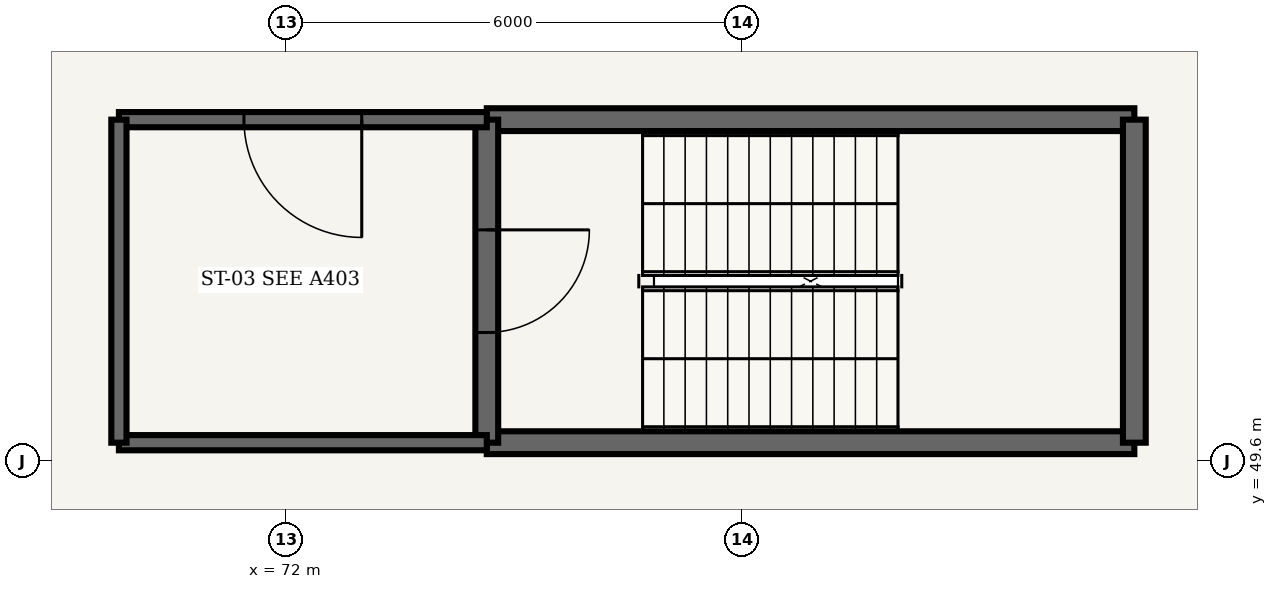
"""IFC4 building model, lengths in metres.
Left out: names, types, materials, properties, quantities, classifications, styles, units other than length and angle.
Written with IfcOpenShell. Run it as: python <this file> out.ifc"""

import sys

from ifc_helpers import new_model, si_unit, direction, frame, frame_2d, origin, place, context, subcontext, project, spatial, rectangle, extrude, element, fill, save


model = new_model("IFC4")
c1 = context("Model", 3, precision=1e-05, world=origin(), true_north=direction((0.0, 1.0)))
c2 = subcontext(c1, "Body", "Model", "MODEL_VIEW")
j1 = project(units=[si_unit("LENGTHUNIT", "METRE"), si_unit("PLANEANGLEUNIT", "RADIAN")], contexts=[c1])
p1 = place(None, origin())
s1 = spatial("IfcSite", under=j1, at=p1, CompositionType="ELEMENT")
p2 = place(p1, origin())
s2 = spatial("IfcBuilding", under=s1, at=p2, CompositionType="ELEMENT")
p3 = place(p2, frame((0.0, 0.0, 15.6)))
s3 = spatial("IfcBuildingStorey", under=s2, at=p3, CompositionType="ELEMENT", Elevation=15.6)
for number, where, z_axis, x_axis in (
    (1, (74.64, 49.84, 0.0), (0.0, 0.0, 1.0), (1.0, 0.0, 0.0)),
    (2, (83.16, 54.09, 0.0), (0.0, 0.0, 1.0), (-1.0, 0.0, 0.0)),
):
    element("IfcWall", number, at=place(p3, frame(where, z_axis=z_axis, x_axis=x_axis)), inside=s3, PredefinedType="SHEAR", context=c2, shape_type="SweptSolid", body=[
        extrude(rectangle(XDim=8.52, YDim=0.3, at=frame_2d((4.26, 0.0))), origin(), (0.0, 0.0, 1.0), 4.55),
    ])
p4 = place(p3, frame((74.64, 54.09, 0.0), z_axis=(0.0, 0.0, 1.0), x_axis=(0.0, -1.0, 0.0)))
e3 = element("IfcWall", 3, at=p4, inside=s3, PredefinedType="SHEAR", context=c2, shape_type="SweptSolid", body=[
    extrude(rectangle(XDim=4.25, YDim=0.3, at=frame_2d((2.125, 0.0))), origin(), (0.0, 0.0, 1.0), 4.55),
])
p5 = place(p4, frame((1.45, 0.0, 0.0)))
e4 = element("IfcOpeningElement", 4, at=p5, cuts=e3, PredefinedType="OPENING", context=c2, shape_type="SweptSolid", body=[
    extrude(rectangle(XDim=1.35, YDim=2.2, at=frame_2d((0.675, 1.1))), frame((0.0, 0.16, 0.0), z_axis=(0.0, -1.0, 0.0), x_axis=(1.0, 0.0, 0.0)), (0.0, 0.0, 1.0), 0.32),
])
p6 = place(p3, frame((83.16, 49.84, 0.0), z_axis=(0.0, 0.0, 1.0), x_axis=(0.0, 1.0, 0.0)))
e5 = element("IfcWall", 5, at=p6, inside=s3, PredefinedType="SHEAR", context=c2, shape_type="SweptSolid", body=[
    extrude(rectangle(XDim=4.25, YDim=0.3, at=frame_2d((2.125, 0.0))), origin(), (0.0, 0.0, 1.0), 4.55),
])
p7 = place(p3, frame((69.8, 49.84, 0.0), z_axis=(0.0, 0.0, 1.0), x_axis=(1.0, 0.0, 0.0)))
e6 = element("IfcWall", 6, at=p7, inside=s3, PredefinedType="SHEAR", context=c2, shape_type="SweptSolid", body=[
    extrude(rectangle(XDim=4.84, YDim=0.2, at=frame_2d((2.42, 0.0))), origin(), (0.0, 0.0, 1.0), 4.55),
])
p8 = place(p3, frame((74.64, 54.09, 0.0), z_axis=(0.0, 0.0, 1.0), x_axis=(-1.0, 0.0, 0.0)))
e7 = element("IfcWall", 7, at=p8, inside=s3, PredefinedType="SHEAR", context=c2, shape_type="SweptSolid", body=[
    extrude(rectangle(XDim=4.84, YDim=0.2, at=frame_2d((2.42, 0.0))), origin(), (0.0, 0.0, 1.0), 4.55),
])
p9 = place(p8, frame((1.645, 0.0, 0.0)))
e8 = element("IfcOpeningElement", 8, at=p9, cuts=e7, PredefinedType="OPENING", context=c2, shape_type="SweptSolid", body=[
    extrude(rectangle(XDim=1.55, YDim=2.2, at=frame_2d((0.775, 1.1))), frame((0.0, 0.11, 0.0), z_axis=(0.0, -1.0, 0.0), x_axis=(1.0, 0.0, 0.0)), (0.0, 0.0, 1.0), 0.22),
])
p10 = place(p3, frame((69.8, 54.09, 0.0), z_axis=(0.0, 0.0, 1.0), x_axis=(0.0, -1.0, 0.0)))
e9 = element("IfcWall", 9, at=p10, inside=s3, PredefinedType="SHEAR", context=c2, shape_type="SweptSolid", body=[
    extrude(rectangle(XDim=4.25, YDim=0.2, at=frame_2d((2.125, 0.0))), origin(), (0.0, 0.0, 1.0), 4.55),
])
p11 = place(p5, origin())
e10 = element("IfcDoor", 10, at=p11, inside=s3, OperationType="SINGLE_SWING_LEFT", PredefinedType="DOOR", context=c2, shape_type="SweptSolid", body=[
    extrude(rectangle(XDim=1.35, YDim=2.2, at=frame_2d((0.675, 1.1))), frame((0.0, 0.025, 0.0), z_axis=(0.0, -1.0, 0.0), x_axis=(1.0, 0.0, 0.0)), (0.0, 0.0, 1.0), 0.05),
])
fill(e4, e10)
p12 = place(p9, origin())
e11 = element("IfcDoor", 11, at=p12, inside=s3, OperationType="SINGLE_SWING_LEFT", PredefinedType="DOOR", context=c2, shape_type="SweptSolid", body=[
    extrude(rectangle(XDim=1.55, YDim=2.2, at=frame_2d((0.775, 1.1))), frame((0.0, 0.025, 0.0), z_axis=(0.0, -1.0, 0.0), x_axis=(1.0, 0.0, 0.0)), (0.0, 0.0, 1.0), 0.05),
])
fill(e8, e11)
save(model, sys.argv[1])
